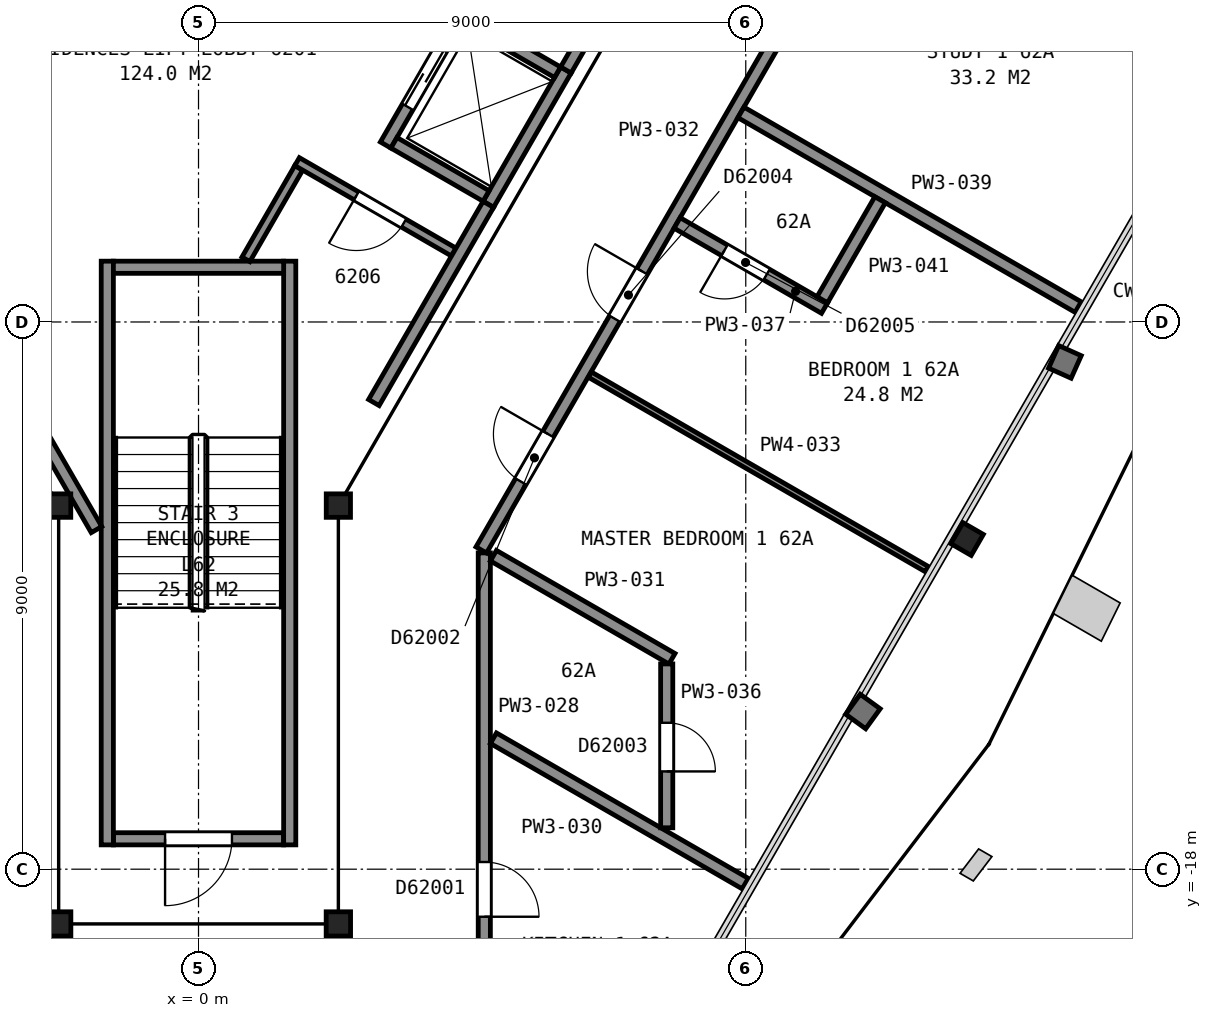
"""IFC4 building model, lengths in metres.
Left out: names, types, materials, properties, quantities, classifications, styles, units other than length and angle.
Written with IfcOpenShell. Run it as: python <this file> out.ifc"""

import sys

from ifc_helpers import new_model, si_unit, direction, frame, frame_2d, origin, origin_2d, place, context, subcontext, project, spatial, rectangle, i_section, extrude, element, fill, save


model = new_model("IFC4")
c1 = context("Model", 3, precision=1e-05, world=origin(), true_north=direction((0.0, 1.0)))
c2 = subcontext(c1, "Body", "Model", "MODEL_VIEW")
j1 = project(units=[si_unit("LENGTHUNIT", "METRE"), si_unit("PLANEANGLEUNIT", "RADIAN")], contexts=[c1])
p1 = place(None, origin())
s1 = spatial("IfcSite", under=j1, at=p1, CompositionType="ELEMENT")
p2 = place(p1, origin())
s2 = spatial("IfcBuilding", under=s1, at=p2, CompositionType="ELEMENT")
p3 = place(p2, frame((0.0, 0.0, 247.1)))
s3 = spatial("IfcBuildingStorey", under=s2, at=p3, CompositionType="ELEMENT", Elevation=247.1)
p4 = place(p3, frame((12.64, -12.57, 0.035), z_axis=(0.0, 0.0, 1.0), x_axis=(-0.5, -0.866025403784, 0.0)))
e1 = element("IfcColumn", 1, at=p4, inside=s3, PredefinedType="COLUMN", context=c2, shape_type="SweptSolid", body=[
    extrude(i_section(OverallWidth=0.399, OverallDepth=0.386, WebThickness=0.021, FlangeThickness=0.033, FilletRadius=0.015, at=origin_2d()), origin(), (0.0, 0.0, 1.0), 3.665),
])
p5 = place(p3, frame((-2.3, -12.02, 0.0), z_axis=(0.0, 0.0, 1.0), x_axis=(1.0, 0.0, 0.0)))
e2 = element("IfcColumn", 2, at=p5, inside=s3, PredefinedType="COLUMN", context=c2, shape_type="SweptSolid", body=[
    extrude(i_section(OverallWidth=0.399, OverallDepth=0.386, WebThickness=0.021, FlangeThickness=0.033, FilletRadius=0.015, at=origin_2d()), origin(), (0.0, 0.0, 1.0), 3.7),
])
for number, where, z_axis, x_axis in (
    (3, (-2.3, -18.9, 0.0), (0.0, 0.0, 1.0), (-1.0, 0.0, 0.0)),
    (4, (2.3, -18.9, 0.0), (0.0, 0.0, 1.0), (-1.0, 0.0, 0.0)),
):
    element("IfcColumn", number, at=place(p3, frame(where, z_axis=z_axis, x_axis=x_axis)), inside=s3, PredefinedType="COLUMN", context=c2, shape_type="SweptSolid", body=[
        extrude(i_section(OverallWidth=0.401, OverallDepth=0.399, WebThickness=0.025, FlangeThickness=0.04, FilletRadius=0.015, at=origin_2d()), origin(), (0.0, 0.0, 1.0), 3.7),
    ])
p6 = place(p3, frame((2.3, -12.02, 0.0), z_axis=(0.0, 0.0, 1.0), x_axis=(1.0, 0.0, 0.0)))
e5 = element("IfcColumn", 5, at=p6, inside=s3, PredefinedType="COLUMN", context=c2, shape_type="SweptSolid", body=[
    extrude(i_section(OverallWidth=0.399, OverallDepth=0.386, WebThickness=0.021, FlangeThickness=0.033, FilletRadius=0.015, at=origin_2d()), origin(), (0.0, 0.0, 1.0), 3.7),
])
p7 = place(p3, frame((-1.4, -17.5, 0.0), z_axis=(0.0, 0.0, 1.0), x_axis=(1.0, 0.0, 0.0)))
e6 = element("IfcWall", 6, at=p7, inside=s3, PredefinedType="PARTITIONING", context=c2, shape_type="SweptSolid", body=[
    extrude(rectangle(XDim=2.8, YDim=0.2, at=frame_2d((1.4, 0.0))), origin(), (0.0, 0.0, 1.0), 3.45),
])
p8 = place(p7, frame((0.85, 0.0, 0.0)))
e7 = element("IfcOpeningElement", 7, at=p8, cuts=e6, PredefinedType="OPENING", context=c2, shape_type="SweptSolid", body=[
    extrude(rectangle(XDim=1.1, YDim=2.1, at=frame_2d((0.55, 1.05))), frame((0.0, 0.11, 0.0), z_axis=(0.0, -1.0, 0.0), x_axis=(1.0, 0.0, 0.0)), (0.0, 0.0, 1.0), 0.22),
])
for number, where, z_axis, x_axis in (
    (8, (1.5, -8.0, 0.0), (0.0, 0.0, 1.0), (0.0, -1.0, 0.0)),
    (9, (-1.5, -8.0, 0.0), (0.0, 0.0, 1.0), (0.0, -1.0, 0.0)),
):
    element("IfcWall", number, at=place(p3, frame(where, z_axis=z_axis, x_axis=x_axis)), inside=s3, PredefinedType="PARTITIONING", context=c2, shape_type="SweptSolid", body=[
        extrude(rectangle(XDim=9.6, YDim=0.2, at=frame_2d((4.8, 0.0))), origin(), (0.0, 0.0, 1.0), 3.45),
    ])
p9 = place(p3, frame((-1.4, -8.1, 0.0), z_axis=(0.0, 0.0, 1.0), x_axis=(1.0, 0.0, 0.0)))
e10 = element("IfcWall", 10, at=p9, inside=s3, PredefinedType="PARTITIONING", context=c2, shape_type="SweptSolid", body=[
    extrude(rectangle(XDim=2.8, YDim=0.2, at=frame_2d((1.4, 0.0))), origin(), (0.0, 0.0, 1.0), 3.45),
])
p10 = place(p3, frame((4.766, -7.065, 0.0), z_axis=(0.0, 0.0, 1.0), x_axis=(0.499948979701, 0.866054858364, 0.0)))
e11 = element("IfcWall", 11, at=p10, inside=s3, PredefinedType="PARTITIONING", context=c2, shape_type="SweptSolid", body=[
    extrude(rectangle(XDim=2.55, YDim=0.2, at=frame_2d((1.275, 0.0))), origin(), (0.0, 0.0, 1.0), 3.7),
])
p11 = place(p3, frame((3.077, -6.09, 0.0), z_axis=(0.0, 0.0, 1.0), x_axis=(0.500062241894, 0.865989465428, 0.0)))
e12 = element("IfcWall", 12, at=p11, inside=s3, PredefinedType="PARTITIONING", context=c2, shape_type="SweptSolid", body=[
    extrude(rectangle(XDim=2.55, YDim=0.2, at=frame_2d((1.275, 0.0))), origin(), (0.0, 0.0, 1.0), 3.7),
])
p12 = place(p11, frame((0.725, 0.0, 0.0)))
e13 = element("IfcOpeningElement", 13, at=p12, cuts=e12, PredefinedType="OPENING", context=c2, shape_type="SweptSolid", body=[
    extrude(rectangle(XDim=1.1, YDim=2.1, at=frame_2d((0.55, 1.05))), frame((0.0, 0.11, 0.0), z_axis=(0.0, -1.0, 0.0), x_axis=(1.0, 0.0, 0.0)), (0.0, 0.0, 1.0), 0.22),
])
p13 = place(p3, frame((5.905, -4.893, 0.0), z_axis=(0.0, 0.0, 1.0), x_axis=(-0.866002029911, 0.500040482552, 0.0)))
e14 = element("IfcWall", 14, at=p13, inside=s3, PredefinedType="PARTITIONING", context=c2, shape_type="SweptSolid", body=[
    extrude(rectangle(XDim=1.75, YDim=0.2, at=frame_2d((0.875, 0.0))), origin(), (0.0, 0.0, 1.0), 3.7),
])
p14 = place(p3, frame((4.73, -6.928, 0.0), z_axis=(0.0, 0.0, 1.0), x_axis=(-0.866036909293, 0.499980071345, 0.0)))
e15 = element("IfcWall", 15, at=p14, inside=s3, PredefinedType="PARTITIONING", context=c2, shape_type="SweptSolid", body=[
    extrude(rectangle(XDim=1.75, YDim=0.2, at=frame_2d((0.875, 0.0))), origin(), (0.0, 0.0, 1.0), 3.7),
])
p15 = place(p3, frame((-4.655, -7.257, 0.0), z_axis=(0.0, 0.0, 1.0), x_axis=(0.499966124405, -0.866044960985, 0.0)))
e16 = element("IfcWall", 16, at=p15, inside=s3, PredefinedType="PARTITIONING", context=c2, shape_type="SweptSolid", body=[
    extrude(rectangle(XDim=5.956, YDim=0.2, at=frame_2d((2.978, 0.0))), origin(), (0.0, 0.0, 1.0), 3.45),
])
p16 = place(p15, frame((0.45, 0.0, 0.0)))
e17 = element("IfcOpeningElement", 17, at=p16, cuts=e16, PredefinedType="OPENING", context=c2, shape_type="SweptSolid", body=[
    extrude(rectangle(XDim=1.8, YDim=2.1, at=frame_2d((0.9, 1.05))), frame((0.0, 0.11, 0.0), z_axis=(0.0, -1.0, 0.0), x_axis=(1.0, 0.0, 0.0)), (0.0, 0.0, 1.0), 0.22),
])
p17 = place(p3, frame((0.78, -7.97, 0.0), z_axis=(0.0, 0.0, 1.0), x_axis=(0.500022437694, 0.866012448988, 0.0)))
e18 = element("IfcWall", 18, at=p17, inside=s3, PredefinedType="PARTITIONING", context=c2, shape_type="SweptSolid", body=[
    extrude(rectangle(XDim=1.738, YDim=0.15, at=frame_2d((0.869, 0.0))), origin(), (0.0, 0.0, 1.0), 3.45),
])
p18 = place(p3, frame((4.198, -7.85, 0.0), z_axis=(0.0, 0.0, 1.0), x_axis=(-0.866017493347, 0.500013701029, 0.0)))
e19 = element("IfcWall", 19, at=p18, inside=s3, PredefinedType="PARTITIONING", context=c2, shape_type="SweptSolid", body=[
    extrude(rectangle(XDim=2.975, YDim=0.15, at=frame_2d((1.488, 0.0))), origin(), (0.0, 0.0, 1.0), 3.45),
])
p19 = place(p18, frame((0.95, 0.0, 0.0)))
e20 = element("IfcOpeningElement", 20, at=p19, cuts=e19, PredefinedType="OPENING", context=c2, shape_type="SweptSolid", body=[
    extrude(rectangle(XDim=0.9, YDim=2.1, at=frame_2d((0.45, 1.05))), frame((0.0, 0.085, 0.0), z_axis=(0.0, -1.0, 0.0), x_axis=(1.0, 0.0, 0.0)), (0.0, 0.0, 1.0), 0.17),
])
p20 = place(p3, frame((2.884, -10.325, 0.0), z_axis=(0.0, 0.0, 1.0), x_axis=(0.500094932804, 0.865970587366, 0.0)))
e21 = element("IfcWall", 21, at=p20, inside=s3, PredefinedType="PARTITIONING", context=c2, shape_type="SweptSolid", body=[
    extrude(rectangle(XDim=3.763, YDim=0.2, at=frame_2d((1.882, 0.0))), origin(), (0.0, 0.0, 1.0), 3.45),
])
p21 = place(p3, frame((6.042, -4.855, 0.0), z_axis=(0.0, 0.0, 1.0), x_axis=(0.500252727967, 0.865879442048, 0.0)))
e22 = element("IfcWall", 22, at=p21, inside=s3, PredefinedType="PARTITIONING", context=c2, shape_type="SweptSolid", body=[
    extrude(rectangle(XDim=2.617, YDim=0.2, at=frame_2d((1.309, 0.0))), origin(), (0.0, 0.0, 1.0), 3.45),
])
p22 = place(p3, frame((4.7, -12.798, 0.0), z_axis=(0.0, 0.0, 1.0), x_axis=(0.0, -1.0, 0.0)))
e23 = element("IfcWall", 23, at=p22, inside=s3, PredefinedType="PARTITIONING", context=c2, shape_type="SweptSolid", body=[
    extrude(rectangle(XDim=8.452, YDim=0.2, at=frame_2d((4.226, 0.0))), origin(), (0.0, 0.0, 1.0), 2.713),
])
p23 = place(p22, frame((5.084, 0.0, 0.0)))
e24 = element("IfcOpeningElement", 24, at=p23, cuts=e23, PredefinedType="OPENING", context=c2, shape_type="SweptSolid", body=[
    extrude(rectangle(XDim=0.9, YDim=2.1, at=frame_2d((0.45, 1.05))), frame((0.0, 0.11, 0.0), z_axis=(0.0, -1.0, 0.0), x_axis=(1.0, 0.0, 0.0)), (0.0, 0.0, 1.0), 0.22),
])
p24 = place(p3, frame((4.85, -15.846, 0.0), z_axis=(0.0, 0.0, 1.0), x_axis=(0.866007055173, -0.500031779381, 0.0)))
e25 = element("IfcWall", 25, at=p24, inside=s3, PredefinedType="PARTITIONING", context=c2, shape_type="SweptSolid", body=[
    extrude(rectangle(XDim=4.782, YDim=0.2, at=frame_2d((2.391, 0.0))), origin(), (0.0, 0.0, 1.0), 2.713),
])
p25 = place(p3, frame((4.85, -12.844, 0.0), z_axis=(0.0, 0.0, 1.0), x_axis=(0.866005731893, -0.500034071167, 0.0)))
e26 = element("IfcWall", 26, at=p25, inside=s3, PredefinedType="PARTITIONING", context=c2, shape_type="SweptSolid", body=[
    extrude(rectangle(XDim=3.391, YDim=0.2, at=frame_2d((1.695, 0.0))), origin(), (0.0, 0.0, 1.0), 2.713),
])
p26 = place(p3, frame((13.342, 2.306, 0.0), z_axis=(0.0, 0.0, 1.0), x_axis=(-0.499983003136, -0.866035216706, 0.0)))
e27 = element("IfcWall", 27, at=p26, inside=s3, PredefinedType="PARTITIONING", context=c2, shape_type="SweptSolid", body=[
    extrude(rectangle(XDim=17.385, YDim=0.2, at=frame_2d((8.692, 0.0))), origin(), (0.0, 0.0, 1.0), 2.713),
])
p27 = place(p26, frame((15.185, 0.0, 0.0)))
e28 = element("IfcOpeningElement", 28, at=p27, cuts=e27, PredefinedType="OPENING", context=c2, shape_type="SweptSolid", body=[
    extrude(rectangle(XDim=0.9, YDim=2.1, at=frame_2d((0.45, 1.05))), frame((0.0, 0.11, 0.0), z_axis=(0.0, -1.0, 0.0), x_axis=(1.0, 0.0, 0.0)), (0.0, 0.0, 1.0), 0.22),
])
p28 = place(p26, frame((12.094, 0.0, 0.0)))
e29 = element("IfcOpeningElement", 29, at=p28, cuts=e27, PredefinedType="OPENING", context=c2, shape_type="SweptSolid", body=[
    extrude(rectangle(XDim=0.9, YDim=2.1, at=frame_2d((0.45, 1.05))), frame((0.0, 0.11, 0.0), z_axis=(0.0, -1.0, 0.0), x_axis=(1.0, 0.0, 0.0)), (0.0, 0.0, 1.0), 0.22),
])
p29 = place(p26, frame((5.867, 0.0, 0.0)))
e30 = element("IfcOpeningElement", 30, at=p29, cuts=e27, PredefinedType="OPENING", context=c2, shape_type="SweptSolid", body=[
    extrude(rectangle(XDim=0.9, YDim=2.1, at=frame_2d((0.45, 1.05))), frame((0.0, 0.11, 0.0), z_axis=(0.0, -1.0, 0.0), x_axis=(1.0, 0.0, 0.0)), (0.0, 0.0, 1.0), 0.22),
])
p30 = place(p26, frame((1.392, 0.0, 0.0)))
e31 = element("IfcOpeningElement", 31, at=p30, cuts=e27, PredefinedType="OPENING", context=c2, shape_type="SweptSolid", body=[
    extrude(rectangle(XDim=0.9, YDim=2.1, at=frame_2d((0.45, 1.05))), frame((0.0, 0.11, 0.0), z_axis=(0.0, -1.0, 0.0), x_axis=(1.0, 0.0, 0.0)), (0.0, 0.0, 1.0), 0.22),
])
p31 = place(p3, frame((6.436, -9.865, 0.0), z_axis=(0.0, 0.0, 1.0), x_axis=(0.866013405822, -0.500020780506, 0.0)))
e32 = element("IfcWall", 32, at=p31, inside=s3, PredefinedType="PARTITIONING", context=c2, shape_type="SweptSolid", body=[
    extrude(rectangle(XDim=6.399, YDim=0.1, at=frame_2d((3.2, 0.0))), origin(), (0.0, 0.0, 1.0), 2.713),
])
p32 = place(p3, frame((7.7, -17.319, 0.0), z_axis=(0.0, 0.0, 1.0), x_axis=(0.0, 1.0, 0.0)))
e33 = element("IfcWall", 33, at=p32, inside=s3, PredefinedType="PARTITIONING", context=c2, shape_type="SweptSolid", body=[
    extrude(rectangle(XDim=2.695, YDim=0.2, at=frame_2d((1.347, 0.0))), origin(), (0.0, 0.0, 1.0), 2.713),
])
p33 = place(p32, frame((0.927, 0.0, 0.0)))
e34 = element("IfcOpeningElement", 34, at=p33, cuts=e33, PredefinedType="OPENING", context=c2, shape_type="SweptSolid", body=[
    extrude(rectangle(XDim=0.8, YDim=2.1, at=frame_2d((0.4, 1.05))), frame((0.0, 0.11, 0.0), z_axis=(0.0, -1.0, 0.0), x_axis=(1.0, 0.0, 0.0)), (0.0, 0.0, 1.0), 0.22),
])
p34 = place(p3, frame((7.871, -7.371, 0.0), z_axis=(0.0, 0.0, 1.0), x_axis=(0.866056369097, -0.49994636267, 0.0)))
e35 = element("IfcWall", 35, at=p34, inside=s3, PredefinedType="PARTITIONING", context=c2, shape_type="SweptSolid", body=[
    extrude(rectangle(XDim=2.8, YDim=0.2, at=frame_2d((1.4, 0.0))), origin(), (0.0, 0.0, 1.0), 2.713),
])
p35 = place(p34, frame((0.9, 0.0, 0.0)))
e36 = element("IfcOpeningElement", 36, at=p35, cuts=e35, PredefinedType="OPENING", context=c2, shape_type="SweptSolid", body=[
    extrude(rectangle(XDim=0.8, YDim=2.1, at=frame_2d((0.4, 1.05))), frame((0.0, 0.11, 0.0), z_axis=(0.0, -1.0, 0.0), x_axis=(1.0, 0.0, 0.0)), (0.0, 0.0, 1.0), 0.22),
])
p36 = place(p3, frame((8.921, -5.553, 0.0), z_axis=(0.0, 0.0, 1.0), x_axis=(0.866026868306, -0.499997463366, 0.0)))
e37 = element("IfcWall", 37, at=p36, inside=s3, PredefinedType="PARTITIONING", context=c2, shape_type="SweptSolid", body=[
    extrude(rectangle(XDim=6.404, YDim=0.2, at=frame_2d((3.202, 0.0))), origin(), (0.0, 0.0, 1.0), 2.713),
])
p37 = place(p3, frame((10.259, -8.635, 0.0), z_axis=(0.0, 0.0, 1.0), x_axis=(0.500078449558, 0.865980106173, 0.0)))
e38 = element("IfcWall", 38, at=p37, inside=s3, PredefinedType="PARTITIONING", context=c2, shape_type="SweptSolid", body=[
    extrude(rectangle(XDim=1.9, YDim=0.2, at=frame_2d((0.95, 0.0))), origin(), (0.0, 0.0, 1.0), 2.713),
])
p38 = place(p8, origin())
e39 = element("IfcDoor", 39, at=p38, inside=s3, OperationType="SINGLE_SWING_LEFT", PredefinedType="DOOR", context=c2, shape_type="SweptSolid", body=[
    extrude(rectangle(XDim=1.1, YDim=2.1, at=frame_2d((0.55, 1.05))), frame((0.0, 0.025, 0.0), z_axis=(0.0, -1.0, 0.0), x_axis=(1.0, 0.0, 0.0)), (0.0, 0.0, 1.0), 0.05),
])
fill(e7, e39)
p39 = place(p12, origin())
e40 = element("IfcDoor", 40, at=p39, inside=s3, OperationType="SLIDING_TO_LEFT", PredefinedType="DOOR", context=c2, shape_type="SweptSolid", body=[
    extrude(rectangle(XDim=1.1, YDim=2.1, at=frame_2d((0.55, 1.05))), frame((0.0, 0.025, 0.0), z_axis=(0.0, -1.0, 0.0), x_axis=(1.0, 0.0, 0.0)), (0.0, 0.0, 1.0), 0.05),
])
fill(e13, e40)
p40 = place(p19, origin())
e41 = element("IfcDoor", 41, at=p40, inside=s3, OperationType="SINGLE_SWING_RIGHT", PredefinedType="DOOR", context=c2, shape_type="SweptSolid", body=[
    extrude(rectangle(XDim=0.9, YDim=2.1, at=frame_2d((0.45, 1.05))), frame((0.0, 0.025, 0.0), z_axis=(0.0, -1.0, 0.0), x_axis=(1.0, 0.0, 0.0)), (0.0, 0.0, 1.0), 0.05),
])
fill(e20, e41)
p41 = place(p23, origin())
e42 = element("IfcDoor", 42, at=p41, inside=s3, OperationType="SINGLE_SWING_RIGHT", PredefinedType="DOOR", context=c2, shape_type="SweptSolid", body=[
    extrude(rectangle(XDim=0.9, YDim=2.1, at=frame_2d((0.45, 1.05))), frame((0.0, 0.025, 0.0), z_axis=(0.0, -1.0, 0.0), x_axis=(1.0, 0.0, 0.0)), (0.0, 0.0, 1.0), 0.05),
])
fill(e24, e42)
p42 = place(p27, origin())
e43 = element("IfcDoor", 43, at=p42, inside=s3, OperationType="SINGLE_SWING_LEFT", PredefinedType="DOOR", context=c2, shape_type="SweptSolid", body=[
    extrude(rectangle(XDim=0.9, YDim=2.1, at=frame_2d((0.45, 1.05))), frame((0.0, 0.025, 0.0), z_axis=(0.0, -1.0, 0.0), x_axis=(1.0, 0.0, 0.0)), (0.0, 0.0, 1.0), 0.05),
])
fill(e28, e43)
p43 = place(p28, origin())
e44 = element("IfcDoor", 44, at=p43, inside=s3, OperationType="SINGLE_SWING_LEFT", PredefinedType="DOOR", context=c2, shape_type="SweptSolid", body=[
    extrude(rectangle(XDim=0.9, YDim=2.1, at=frame_2d((0.45, 1.05))), frame((0.0, 0.025, 0.0), z_axis=(0.0, -1.0, 0.0), x_axis=(1.0, 0.0, 0.0)), (0.0, 0.0, 1.0), 0.05),
])
fill(e29, e44)
p44 = place(p33, origin())
e45 = element("IfcDoor", 45, at=p44, inside=s3, OperationType="SINGLE_SWING_LEFT", PredefinedType="DOOR", context=c2, shape_type="SweptSolid", body=[
    extrude(rectangle(XDim=0.8, YDim=2.1, at=frame_2d((0.4, 1.05))), frame((0.0, 0.025, 0.0), z_axis=(0.0, -1.0, 0.0), x_axis=(1.0, 0.0, 0.0)), (0.0, 0.0, 1.0), 0.05),
])
fill(e34, e45)
p45 = place(p35, origin())
e46 = element("IfcDoor", 46, at=p45, inside=s3, OperationType="SINGLE_SWING_LEFT", PredefinedType="DOOR", context=c2, shape_type="SweptSolid", body=[
    extrude(rectangle(XDim=0.8, YDim=2.1, at=frame_2d((0.4, 1.05))), frame((0.0, 0.025, 0.0), z_axis=(0.0, -1.0, 0.0), x_axis=(1.0, 0.0, 0.0)), (0.0, 0.0, 1.0), 0.05),
])
fill(e36, e46)
save(model, sys.argv[1])
